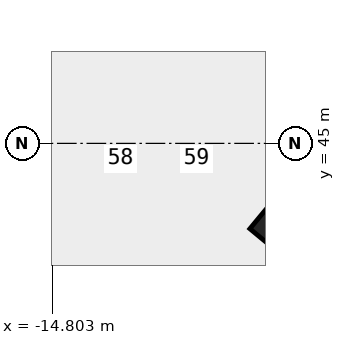
"""IFC4 building model, lengths in metres.
Left out: names, types, materials, properties, quantities, classifications, styles, units other than length and angle.
Written with IfcOpenShell. Run it as: python <this file> out.ifc"""

import sys

from ifc_helpers import new_model, si_unit, direction, frame, origin, origin_2d, place, context, subcontext, project, spatial, rectangle, extrude, element, save


model = new_model("IFC4")
c1 = context("Model", 3, precision=1e-05, world=origin(), true_north=direction((0.0, 1.0)))
c2 = subcontext(c1, "Body", "Model", "MODEL_VIEW")
j1 = project(units=[si_unit("LENGTHUNIT", "METRE"), si_unit("PLANEANGLEUNIT", "RADIAN")], contexts=[c1])
p1 = place(None, origin())
s1 = spatial("IfcSite", under=j1, at=p1, CompositionType="ELEMENT")
p2 = place(p1, origin())
s2 = spatial("IfcBuilding", under=s1, at=p2, CompositionType="ELEMENT")
p3 = place(p2, frame((0.0, 0.0, -11.0)))
s3 = spatial("IfcBuildingStorey", under=s2, at=p3, CompositionType="ELEMENT", Elevation=-11.0)
p4 = place(p3, frame((-7.299, 42.144, -0.42), z_axis=(0.0, 0.0, 1.0), x_axis=(0.637666022163, 0.770312952103, 0.0)))
e1 = element("IfcColumn", 1, at=p4, inside=s3, PredefinedType="COLUMN", context=c2, shape_type="SweptSolid", body=[
    extrude(rectangle(XDim=1.2, YDim=1.6, at=origin_2d()), origin(), (0.0, 0.0, 1.0), 5.5),
])
save(model, sys.argv[1])
